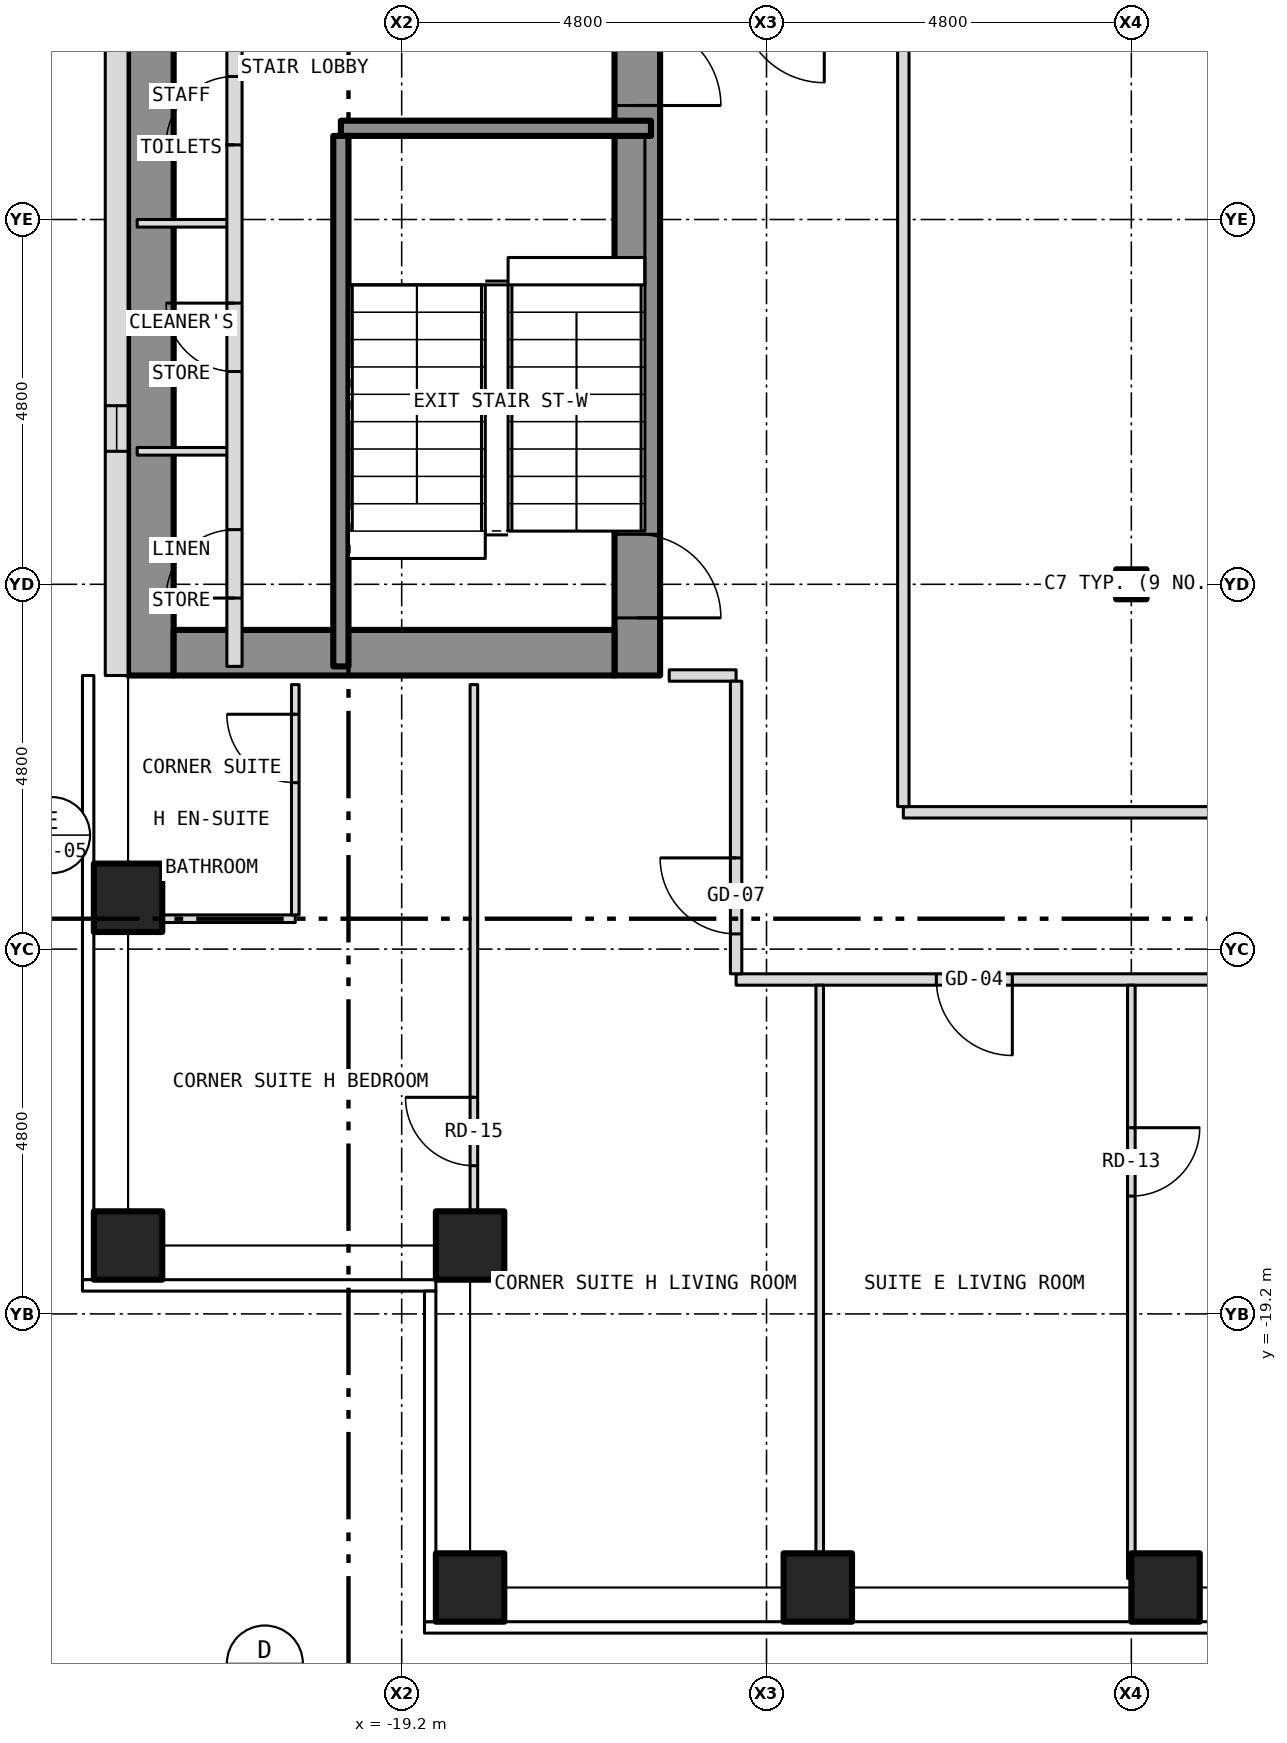
"""IFC4 building model, lengths in metres.
Left out: names, types, materials, properties, quantities, classifications, styles, units other than length and angle.
Written with IfcOpenShell. Run it as: python <this file> out.ifc"""

import sys

from ifc_helpers import new_model, si_unit, direction, frame, frame_2d, origin, origin_2d, place, context, subcontext, project, spatial, rectangle, hollow_rectangle, i_section, extrude, element, fill, save


model = new_model("IFC4")
c1 = context("Model", 3, precision=1e-05, world=origin(), true_north=direction((0.0, 1.0)))
c2 = subcontext(c1, "Body", "Model", "MODEL_VIEW")
j1 = project(units=[si_unit("LENGTHUNIT", "METRE"), si_unit("PLANEANGLEUNIT", "RADIAN")], contexts=[c1])
p1 = place(None, origin())
s1 = spatial("IfcSite", under=j1, at=p1, CompositionType="ELEMENT")
p2 = place(p1, origin())
s2 = spatial("IfcBuilding", under=s1, at=p2, CompositionType="ELEMENT")
p3 = place(p2, frame((0.0, 0.0, 106.5)))
s3 = spatial("IfcBuildingStorey", under=s2, at=p3, CompositionType="ELEMENT", Elevation=106.5)
for number, where, z_axis, x_axis in (
    (1, (-18.3, -22.8, -0.15), (0.0, 0.0, 1.0), (1.0, 0.0, 0.0)),
    (2, (-13.725, -22.8, -0.15), (0.0, 0.0, 1.0), (1.0, 0.0, 0.0)),
    (3, (-9.15, -22.8, -0.15), (0.0, 0.0, 1.0), (1.0, 0.0, 0.0)),
    (4, (-22.8, -18.3, -0.15), (0.0, 0.0, 1.0), (1.0, 0.0, 0.0)),
    (5, (-22.8, -13.725, -0.15), (0.0, 0.0, 1.0), (1.0, 0.0, 0.0)),
    (6, (-18.3, -18.3, -0.15), (0.0, 0.0, 1.0), (1.0, 0.0, 0.0)),
):
    element("IfcColumn", number, at=place(p3, frame(where, z_axis=z_axis, x_axis=x_axis)), inside=s3, PredefinedType="COLUMN", context=c2, shape_type="SweptSolid", body=[
        extrude(hollow_rectangle(XDim=0.9, YDim=0.9, WallThickness=0.05, at=origin_2d()), origin(), (0.0, 0.0, 1.0), 3.5),
    ])
p4 = place(p3, frame((-9.6, -9.6, -0.15), z_axis=(0.0, 0.0, 1.0), x_axis=(1.0, 0.0, 0.0)))
e7 = element("IfcColumn", 7, at=p4, inside=s3, PredefinedType="COLUMN", context=c2, shape_type="SweptSolid", body=[
    extrude(i_section(OverallWidth=0.399, OverallDepth=0.394, WebThickness=0.023, FlangeThickness=0.037, at=origin_2d()), origin(), (0.0, 0.0, 1.0), 3.5),
])
p5 = place(p3, frame((-16.1, -10.8, 0.0), z_axis=(0.0, 0.0, 1.0), x_axis=(0.0, 1.0, 0.0)))
e8 = element("IfcWall", 8, at=p5, inside=s3, PredefinedType="SHEAR", context=c2, shape_type="SweptSolid", body=[
    extrude(rectangle(XDim=21.6, YDim=0.6, at=frame_2d((10.8, 0.0))), origin(), (0.0, 0.0, 1.0), 3.25),
])
p6 = place(p5, frame((9.4, 0.0, 0.0)))
e9 = element("IfcOpeningElement", 9, at=p6, cuts=e8, PredefinedType="OPENING", context=c2, shape_type="SweptSolid", body=[
    extrude(rectangle(XDim=1.1, YDim=2.1, at=frame_2d((0.55, 1.05))), frame((0.0, 0.312, 0.0), z_axis=(0.0, -1.0, 0.0), x_axis=(1.0, 0.0, 0.0)), (0.0, 0.0, 1.0), 0.624),
])
p7 = place(p5, frame((11.5, 0.0, 0.0)))
e10 = element("IfcOpeningElement", 10, at=p7, cuts=e8, PredefinedType="OPENING", context=c2, shape_type="SweptSolid", body=[
    extrude(rectangle(XDim=1.1, YDim=2.1, at=frame_2d((0.55, 1.05))), frame((0.0, 0.312, 0.0), z_axis=(0.0, -1.0, 0.0), x_axis=(1.0, 0.0, 0.0)), (0.0, 0.0, 1.0), 0.624),
])
p8 = place(p5, frame((13.6, 0.0, 0.0)))
e11 = element("IfcOpeningElement", 11, at=p8, cuts=e8, PredefinedType="OPENING", context=c2, shape_type="SweptSolid", body=[
    extrude(rectangle(XDim=1.1, YDim=2.1, at=frame_2d((0.55, 1.05))), frame((0.0, 0.312, 0.0), z_axis=(0.0, -1.0, 0.0), x_axis=(1.0, 0.0, 0.0)), (0.0, 0.0, 1.0), 0.624),
])
p9 = place(p5, frame((15.7, 0.0, 0.0)))
e12 = element("IfcOpeningElement", 12, at=p9, cuts=e8, PredefinedType="OPENING", context=c2, shape_type="SweptSolid", body=[
    extrude(rectangle(XDim=1.1, YDim=2.1, at=frame_2d((0.55, 1.05))), frame((0.0, 0.312, 0.0), z_axis=(0.0, -1.0, 0.0), x_axis=(1.0, 0.0, 0.0)), (0.0, 0.0, 1.0), 0.624),
])
p10 = place(p5, frame((17.8, 0.0, 0.0)))
e13 = element("IfcOpeningElement", 13, at=p10, cuts=e8, PredefinedType="OPENING", context=c2, shape_type="SweptSolid", body=[
    extrude(rectangle(XDim=1.1, YDim=2.1, at=frame_2d((0.55, 1.05))), frame((0.0, 0.312, 0.0), z_axis=(0.0, -1.0, 0.0), x_axis=(1.0, 0.0, 0.0)), (0.0, 0.0, 1.0), 0.624),
])
p11 = place(p5, frame((0.758, 0.0, 0.0)))
e14 = element("IfcOpeningElement", 14, at=p11, cuts=e8, PredefinedType="OPENING", context=c2, shape_type="SweptSolid", body=[
    extrude(rectangle(XDim=1.1, YDim=2.1, at=frame_2d((0.55, 1.05))), frame((0.0, 0.312, 0.0), z_axis=(0.0, -1.0, 0.0), x_axis=(1.0, 0.0, 0.0)), (0.0, 0.0, 1.0), 0.624),
])
p12 = place(p5, frame((7.5, 0.0, 0.0)))
e15 = element("IfcOpeningElement", 15, at=p12, cuts=e8, PredefinedType="OPENING", context=c2, shape_type="SweptSolid", body=[
    extrude(rectangle(XDim=1.1, YDim=2.1, at=frame_2d((0.55, 1.05))), frame((0.0, 0.312, 0.0), z_axis=(0.0, -1.0, 0.0), x_axis=(1.0, 0.0, 0.0)), (0.0, 0.0, 1.0), 0.624),
])
p13 = place(p3, frame((-22.5, -10.8, 0.0), z_axis=(0.0, 0.0, 1.0), x_axis=(0.0, 1.0, 0.0)))
e16 = element("IfcWall", 16, at=p13, inside=s3, PredefinedType="SHEAR", context=c2, shape_type="SweptSolid", body=[
    extrude(rectangle(XDim=21.6, YDim=0.6, at=frame_2d((10.8, 0.0))), origin(), (0.0, 0.0, 1.0), 3.25),
])
p14 = place(p3, frame((-22.2, -10.5, 0.0), z_axis=(0.0, 0.0, 1.0), x_axis=(1.0, 0.0, 0.0)))
e17 = element("IfcWall", 17, at=p14, inside=s3, PredefinedType="SHEAR", context=c2, shape_type="SweptSolid", body=[
    extrude(rectangle(XDim=5.8, YDim=0.6, at=frame_2d((2.9, 0.0))), origin(), (0.0, 0.0, 1.0), 3.25),
])
p15 = place(p3, frame((-22.95, 10.8, 0.0), z_axis=(0.0, 0.0, 1.0), x_axis=(0.0, -1.0, 0.0)))
e18 = element("IfcWall", 18, at=p15, inside=s3, PredefinedType="SOLIDWALL", context=c2, shape_type="SweptSolid", body=[
    extrude(rectangle(XDim=21.6, YDim=0.3, at=frame_2d((10.8, 0.0))), origin(), (0.0, 0.0, 1.0), 3.5),
])
p16 = place(p15, frame((18.05, 0.0, 1.0)))
e19 = element("IfcOpeningElement", 19, at=p16, cuts=e18, PredefinedType="OPENING", context=c2, shape_type="SweptSolid", body=[
    extrude(rectangle(XDim=0.6, YDim=1.5, at=frame_2d((0.3, 0.75))), frame((0.0, 0.162, 0.0), z_axis=(0.0, -1.0, 0.0), x_axis=(1.0, 0.0, 0.0)), (0.0, 0.0, 1.0), 0.324),
])
p17 = place(p3, frame((-14.8, -14.8, 0.0), z_axis=(0.0, 0.0, 1.0), x_axis=(1.0, 0.0, 0.0)))
e20 = element("IfcWall", 20, at=p17, inside=s3, PredefinedType="PARTITIONING", context=c2, shape_type="SweptSolid", body=[
    extrude(rectangle(XDim=29.6, YDim=0.15, at=frame_2d((14.8, 0.0))), origin(), (0.0, 0.0, 1.0), 3.35),
])
p18 = place(p17, frame((2.634, 0.0, 0.0)))
e21 = element("IfcOpeningElement", 21, at=p18, cuts=e20, PredefinedType="OPENING", context=c2, shape_type="SweptSolid", body=[
    extrude(rectangle(XDim=1.0, YDim=2.1, at=frame_2d((0.5, 1.05))), frame((0.0, 0.087, 0.0), z_axis=(0.0, -1.0, 0.0), x_axis=(1.0, 0.0, 0.0)), (0.0, 0.0, 1.0), 0.174),
])
p19 = place(p17, frame((20.362, 0.0, 0.0)))
e22 = element("IfcOpeningElement", 22, at=p19, cuts=e20, PredefinedType="OPENING", context=c2, shape_type="SweptSolid", body=[
    extrude(rectangle(XDim=1.0, YDim=2.1, at=frame_2d((0.5, 1.05))), frame((0.0, 0.087, 0.0), z_axis=(0.0, -1.0, 0.0), x_axis=(1.0, 0.0, 0.0)), (0.0, 0.0, 1.0), 0.174),
])
p20 = place(p17, frame((26.837, 0.0, 0.0)))
e23 = element("IfcOpeningElement", 23, at=p20, cuts=e20, PredefinedType="OPENING", context=c2, shape_type="SweptSolid", body=[
    extrude(rectangle(XDim=1.0, YDim=2.1, at=frame_2d((0.5, 1.05))), frame((0.0, 0.087, 0.0), z_axis=(0.0, -1.0, 0.0), x_axis=(1.0, 0.0, 0.0)), (0.0, 0.0, 1.0), 0.174),
])
p21 = place(p3, frame((-22.68, -14.0, 0.0), z_axis=(0.0, 0.0, 1.0), x_axis=(1.0, 0.0, 0.0)))
e24 = element("IfcWall", 24, at=p21, inside=s3, PredefinedType="PARTITIONING", context=c2, shape_type="SweptSolid", body=[
    extrude(rectangle(XDim=2.08, YDim=0.1, at=frame_2d((1.04, 0.0))), origin(), (0.0, 0.0, 1.0), 3.35),
])
p22 = place(p3, frame((-12.6, -12.6, 0.0), z_axis=(0.0, 0.0, 1.0), x_axis=(1.0, 0.0, 0.0)))
e25 = element("IfcWall", 25, at=p22, inside=s3, PredefinedType="PARTITIONING", context=c2, shape_type="SweptSolid", body=[
    extrude(rectangle(XDim=16.7, YDim=0.15, at=frame_2d((8.35, 0.0))), origin(), (0.0, 0.0, 1.0), 3.35),
])
p23 = place(p3, frame((-15.68, -10.8, 0.0), z_axis=(0.0, 0.0, 1.0), x_axis=(1.0, 0.0, 0.0)))
e26 = element("IfcWall", 26, at=p23, inside=s3, PredefinedType="PARTITIONING", context=c2, shape_type="SweptSolid", body=[
    extrude(rectangle(XDim=0.88, YDim=0.15, at=frame_2d((0.44, 0.0))), origin(), (0.0, 0.0, 1.0), 3.35),
])
for number, where, z_axis, x_axis in (
    (27, (-22.68, -7.85, 0.0), (0.0, 0.0, 1.0), (1.0, 0.0, 0.0)),
    (28, (-22.68, -4.85, 0.0), (0.0, 0.0, 1.0), (1.0, 0.0, 0.0)),
):
    element("IfcWall", number, at=place(p3, frame(where, z_axis=z_axis, x_axis=x_axis)), inside=s3, PredefinedType="PARTITIONING", context=c2, shape_type="SweptSolid", body=[
        extrude(rectangle(XDim=1.28, YDim=0.1, at=frame_2d((0.64, 0.0))), origin(), (0.0, 0.0, 1.0), 3.25),
    ])
p24 = place(p3, frame((-20.0, -3.6, 0.0), z_axis=(0.0, 0.0, 1.0), x_axis=(1.0, 0.0, 0.0)))
e29 = element("IfcWall", 29, at=p24, inside=s3, PredefinedType="SHEAR", context=c2, shape_type="SweptSolid", body=[
    extrude(rectangle(XDim=4.08, YDim=0.2, at=frame_2d((2.04, 0.0))), origin(), (0.0, 0.0, 1.0), 3.25),
])
p25 = place(p3, frame((-21.4, -10.68, 0.0), z_axis=(0.0, 0.0, 1.0), x_axis=(0.0, 1.0, 0.0)))
e30 = element("IfcWall", 30, at=p25, inside=s3, PredefinedType="PARTITIONING", context=c2, shape_type="SweptSolid", body=[
    extrude(rectangle(XDim=8.68, YDim=0.2, at=frame_2d((4.34, 0.0))), origin(), (0.0, 0.0, 1.0), 3.25),
])
p26 = place(p25, frame((0.899, 0.0, 0.0)))
e31 = element("IfcOpeningElement", 31, at=p26, cuts=e30, PredefinedType="OPENING", context=c2, shape_type="SweptSolid", body=[
    extrude(rectangle(XDim=0.9, YDim=2.1, at=frame_2d((0.45, 1.05))), frame((0.0, 0.112, 0.0), z_axis=(0.0, -1.0, 0.0), x_axis=(1.0, 0.0, 0.0)), (0.0, 0.0, 1.0), 0.224),
])
p27 = place(p25, frame((3.88, 0.0, 0.0)))
e32 = element("IfcOpeningElement", 32, at=p27, cuts=e30, PredefinedType="OPENING", context=c2, shape_type="SweptSolid", body=[
    extrude(rectangle(XDim=0.9, YDim=2.1, at=frame_2d((0.45, 1.05))), frame((0.0, 0.112, 0.0), z_axis=(0.0, -1.0, 0.0), x_axis=(1.0, 0.0, 0.0)), (0.0, 0.0, 1.0), 0.224),
])
p28 = place(p25, frame((6.862, 0.0, 0.0)))
e33 = element("IfcOpeningElement", 33, at=p28, cuts=e30, PredefinedType="OPENING", context=c2, shape_type="SweptSolid", body=[
    extrude(rectangle(XDim=0.9, YDim=2.1, at=frame_2d((0.45, 1.05))), frame((0.0, 0.112, 0.0), z_axis=(0.0, -1.0, 0.0), x_axis=(1.0, 0.0, 0.0)), (0.0, 0.0, 1.0), 0.224),
])
p29 = place(p3, frame((-20.6, -13.95, 0.0), z_axis=(0.0, 0.0, 1.0), x_axis=(0.0, 1.0, 0.0)))
e34 = element("IfcWall", 34, at=p29, inside=s3, PredefinedType="PARTITIONING", context=c2, shape_type="SweptSolid", body=[
    extrude(rectangle(XDim=3.03, YDim=0.1, at=frame_2d((1.515, 0.0))), origin(), (0.0, 0.0, 1.0), 3.35),
])
p30 = place(p29, frame((1.74, 0.0, 0.0)))
e35 = element("IfcOpeningElement", 35, at=p30, cuts=e34, PredefinedType="OPENING", context=c2, shape_type="SweptSolid", body=[
    extrude(rectangle(XDim=0.9, YDim=2.1, at=frame_2d((0.45, 1.05))), frame((0.0, 0.062, 0.0), z_axis=(0.0, -1.0, 0.0), x_axis=(1.0, 0.0, 0.0)), (0.0, 0.0, 1.0), 0.124),
])
p31 = place(p3, frame((-20.0, -10.68, 0.0), z_axis=(0.0, 0.0, 1.0), x_axis=(0.0, 1.0, 0.0)))
e36 = element("IfcWall", 36, at=p31, inside=s3, PredefinedType="SHEAR", context=c2, shape_type="SweptSolid", body=[
    extrude(rectangle(XDim=6.98, YDim=0.2, at=frame_2d((3.49, 0.0))), origin(), (0.0, 0.0, 1.0), 3.25),
])
p32 = place(p3, frame((-18.25, -18.191, 0.0), z_axis=(0.0, 0.0, 1.0), x_axis=(0.0, 1.0, 0.0)))
e37 = element("IfcWall", 37, at=p32, inside=s3, PredefinedType="PARTITIONING", context=c2, shape_type="SweptSolid", body=[
    extrude(rectangle(XDim=7.271, YDim=0.1, at=frame_2d((3.635, 0.0))), origin(), (0.0, 0.0, 1.0), 3.35),
])
p33 = place(p32, frame((0.941, 0.0, 0.0)))
e38 = element("IfcOpeningElement", 38, at=p33, cuts=e37, PredefinedType="OPENING", context=c2, shape_type="SweptSolid", body=[
    extrude(rectangle(XDim=0.9, YDim=2.1, at=frame_2d((0.45, 1.05))), frame((0.0, 0.062, 0.0), z_axis=(0.0, -1.0, 0.0), x_axis=(1.0, 0.0, 0.0)), (0.0, 0.0, 1.0), 0.124),
])
p34 = place(p3, frame((-14.8, -14.725, 0.0), z_axis=(0.0, 0.0, 1.0), x_axis=(0.0, 1.0, 0.0)))
e39 = element("IfcWall", 39, at=p34, inside=s3, PredefinedType="PARTITIONING", context=c2, shape_type="SweptSolid", body=[
    extrude(rectangle(XDim=3.85, YDim=0.15, at=frame_2d((1.925, 0.0))), origin(), (0.0, 0.0, 1.0), 3.35),
])
p35 = place(p34, frame((0.525, 0.0, 0.0)))
e40 = element("IfcOpeningElement", 40, at=p35, cuts=e39, PredefinedType="OPENING", context=c2, shape_type="SweptSolid", body=[
    extrude(rectangle(XDim=1.0, YDim=2.1, at=frame_2d((0.5, 1.05))), frame((0.0, 0.087, 0.0), z_axis=(0.0, -1.0, 0.0), x_axis=(1.0, 0.0, 0.0)), (0.0, 0.0, 1.0), 0.174),
])
p36 = place(p3, frame((-13.7, -22.68, 0.0), z_axis=(0.0, 0.0, 1.0), x_axis=(0.0, 1.0, 0.0)))
e41 = element("IfcWall", 41, at=p36, inside=s3, PredefinedType="PARTITIONING", context=c2, shape_type="SweptSolid", body=[
    extrude(rectangle(XDim=7.805, YDim=0.1, at=frame_2d((3.902, 0.0))), origin(), (0.0, 0.0, 1.0), 3.35),
])
p37 = place(p3, frame((-12.6, -12.525, 0.0), z_axis=(0.0, 0.0, 1.0), x_axis=(0.0, 1.0, 0.0)))
e42 = element("IfcWall", 42, at=p37, inside=s3, PredefinedType="PARTITIONING", context=c2, shape_type="SweptSolid", body=[
    extrude(rectangle(XDim=10.525, YDim=0.15, at=frame_2d((5.262, 0.0))), origin(), (0.0, 0.0, 1.0), 3.35),
])
p38 = place(p3, frame((-9.6, -22.68, 0.0), z_axis=(0.0, 0.0, 1.0), x_axis=(0.0, 1.0, 0.0)))
e43 = element("IfcWall", 43, at=p38, inside=s3, PredefinedType="PARTITIONING", context=c2, shape_type="SweptSolid", body=[
    extrude(rectangle(XDim=0.33, YDim=0.1, at=frame_2d((0.165, 0.0))), origin(), (0.0, 0.0, 1.0), 3.35),
])
p39 = place(p3, frame((-9.6, -22.35, 0.0), z_axis=(0.0, 0.0, 1.0), x_axis=(0.0, 1.0, 0.0)))
e44 = element("IfcWall", 44, at=p39, inside=s3, PredefinedType="PARTITIONING", context=c2, shape_type="SweptSolid", body=[
    extrude(rectangle(XDim=7.475, YDim=0.1, at=frame_2d((3.738, 0.0))), origin(), (0.0, 0.0, 1.0), 2.728),
])
p40 = place(p39, frame((4.7, 0.0, 0.0)))
e45 = element("IfcOpeningElement", 45, at=p40, cuts=e44, PredefinedType="OPENING", context=c2, shape_type="SweptSolid", body=[
    extrude(rectangle(XDim=0.9, YDim=2.1, at=frame_2d((0.45, 1.05))), frame((0.0, 0.062, 0.0), z_axis=(0.0, -1.0, 0.0), x_axis=(1.0, 0.0, 0.0)), (0.0, 0.0, 1.0), 0.124),
])
p41 = place(p16, origin())
e46 = element("IfcWindow", 46, at=p41, inside=s3, PartitioningType="SINGLE_PANEL", PredefinedType="WINDOW", context=c2, shape_type="SweptSolid", body=[
    extrude(rectangle(XDim=0.6, YDim=1.5, at=frame_2d((0.3, 0.75))), frame((0.0, -0.06, 0.0), z_axis=(0.0, -1.0, 0.0), x_axis=(1.0, 0.0, 0.0)), (0.0, 0.0, 1.0), 0.06),
])
fill(e19, e46)
p42 = place(p11, origin())
e47 = element("IfcDoor", 47, at=p42, inside=s3, OperationType="SINGLE_SWING_LEFT", PredefinedType="DOOR", context=c2, shape_type="SweptSolid", body=[
    extrude(rectangle(XDim=1.1, YDim=2.1, at=frame_2d((0.55, 1.05))), frame((0.0, 0.025, 0.0), z_axis=(0.0, -1.0, 0.0), x_axis=(1.0, 0.0, 0.0)), (0.0, 0.0, 1.0), 0.05),
])
fill(e14, e47)
p43 = place(p12, origin())
e48 = element("IfcDoor", 48, at=p43, inside=s3, OperationType="SINGLE_SWING_LEFT", PredefinedType="DOOR", context=c2, shape_type="SweptSolid", body=[
    extrude(rectangle(XDim=1.1, YDim=2.1, at=frame_2d((0.55, 1.05))), frame((0.0, 0.025, 0.0), z_axis=(0.0, -1.0, 0.0), x_axis=(1.0, 0.0, 0.0)), (0.0, 0.0, 1.0), 0.05),
])
fill(e15, e48)
p44 = place(p26, origin())
e49 = element("IfcDoor", 49, at=p44, inside=s3, OperationType="SINGLE_SWING_LEFT", PredefinedType="DOOR", context=c2, shape_type="SweptSolid", body=[
    extrude(rectangle(XDim=0.9, YDim=2.1, at=frame_2d((0.45, 1.05))), frame((0.0, 0.025, 0.0), z_axis=(0.0, -1.0, 0.0), x_axis=(1.0, 0.0, 0.0)), (0.0, 0.0, 1.0), 0.05),
])
fill(e31, e49)
p45 = place(p27, origin())
e50 = element("IfcDoor", 50, at=p45, inside=s3, OperationType="SINGLE_SWING_RIGHT", PredefinedType="DOOR", context=c2, shape_type="SweptSolid", body=[
    extrude(rectangle(XDim=0.9, YDim=2.1, at=frame_2d((0.45, 1.05))), frame((0.0, 0.025, 0.0), z_axis=(0.0, -1.0, 0.0), x_axis=(1.0, 0.0, 0.0)), (0.0, 0.0, 1.0), 0.05),
])
fill(e32, e50)
p46 = place(p28, origin())
e51 = element("IfcDoor", 51, at=p46, inside=s3, OperationType="SINGLE_SWING_LEFT", PredefinedType="DOOR", context=c2, shape_type="SweptSolid", body=[
    extrude(rectangle(XDim=0.9, YDim=2.1, at=frame_2d((0.45, 1.05))), frame((0.0, 0.025, 0.0), z_axis=(0.0, -1.0, 0.0), x_axis=(1.0, 0.0, 0.0)), (0.0, 0.0, 1.0), 0.05),
])
fill(e33, e51)
p47 = place(p18, origin())
e52 = element("IfcDoor", 52, at=p47, inside=s3, OperationType="SINGLE_SWING_RIGHT", PredefinedType="DOOR", context=c2, shape_type="SweptSolid", body=[
    extrude(rectangle(XDim=1.0, YDim=2.1, at=frame_2d((0.5, 1.05))), frame((0.0, 0.025, 0.0), z_axis=(0.0, -1.0, 0.0), x_axis=(1.0, 0.0, 0.0)), (0.0, 0.0, 1.0), 0.05),
])
fill(e21, e52)
p48 = place(p40, origin())
e53 = element("IfcDoor", 53, at=p48, inside=s3, OperationType="SINGLE_SWING_RIGHT", PredefinedType="DOOR", context=c2, shape_type="SweptSolid", body=[
    extrude(rectangle(XDim=0.9, YDim=2.1, at=frame_2d((0.45, 1.05))), frame((0.0, 0.025, 0.0), z_axis=(0.0, -1.0, 0.0), x_axis=(1.0, 0.0, 0.0)), (0.0, 0.0, 1.0), 0.05),
])
fill(e45, e53)
p49 = place(p35, origin())
e54 = element("IfcDoor", 54, at=p49, inside=s3, OperationType="SINGLE_SWING_RIGHT", PredefinedType="DOOR", context=c2, shape_type="SweptSolid", body=[
    extrude(rectangle(XDim=1.0, YDim=2.1, at=frame_2d((0.5, 1.05))), frame((0.0, 0.025, 0.0), z_axis=(0.0, -1.0, 0.0), x_axis=(1.0, 0.0, 0.0)), (0.0, 0.0, 1.0), 0.05),
])
fill(e40, e54)
p50 = place(p33, origin())
e55 = element("IfcDoor", 55, at=p50, inside=s3, OperationType="SINGLE_SWING_RIGHT", PredefinedType="DOOR", context=c2, shape_type="SweptSolid", body=[
    extrude(rectangle(XDim=0.9, YDim=2.1, at=frame_2d((0.45, 1.05))), frame((0.0, 0.025, 0.0), z_axis=(0.0, -1.0, 0.0), x_axis=(1.0, 0.0, 0.0)), (0.0, 0.0, 1.0), 0.05),
])
fill(e38, e55)
p51 = place(p30, origin())
e56 = element("IfcDoor", 56, at=p51, inside=s3, OperationType="SINGLE_SWING_RIGHT", PredefinedType="DOOR", context=c2, shape_type="SweptSolid", body=[
    extrude(rectangle(XDim=0.9, YDim=2.1, at=frame_2d((0.45, 1.05))), frame((0.0, 0.025, 0.0), z_axis=(0.0, -1.0, 0.0), x_axis=(1.0, 0.0, 0.0)), (0.0, 0.0, 1.0), 0.05),
])
fill(e35, e56)
save(model, sys.argv[1])
